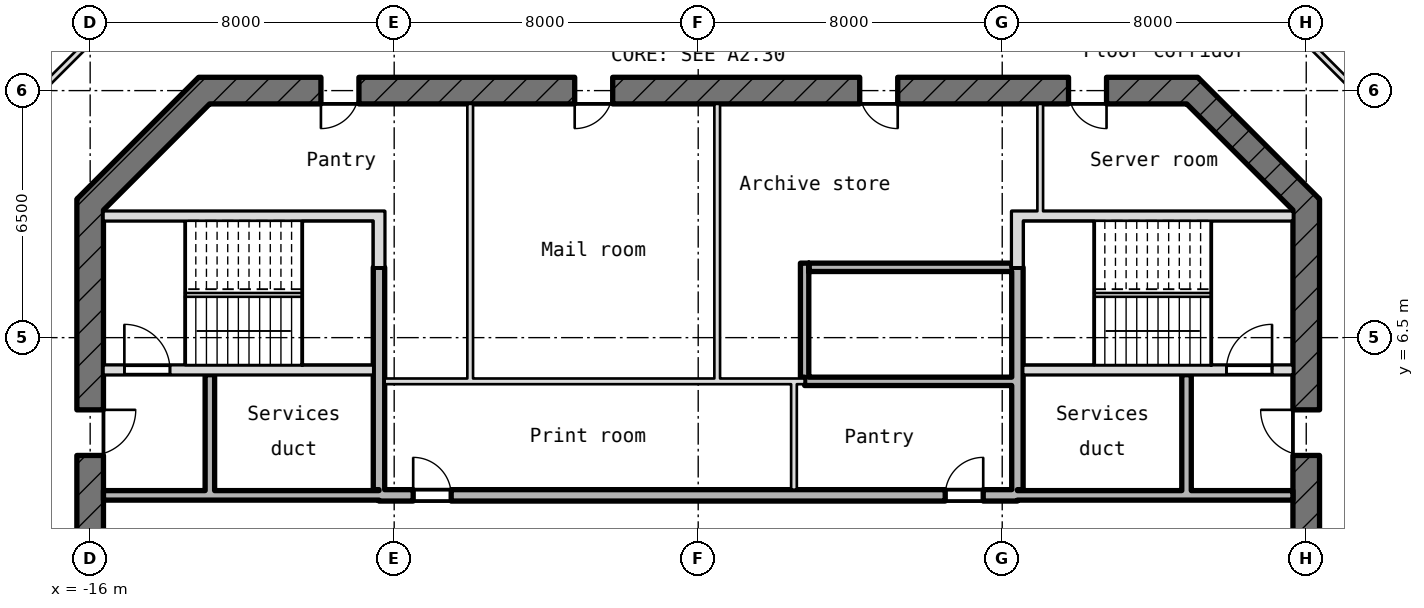
"""IFC4 building model, lengths in metres.
Left out: names, types, materials, properties, quantities, classifications, styles, units other than length and angle.
Written with IfcOpenShell. Run it as: python <this file> out.ifc"""

import sys

from ifc_helpers import new_model, si_unit, direction, frame, frame_2d, origin, place, context, subcontext, project, spatial, rectangle, extrude, element, fill, save


model = new_model("IFC4")
c1 = context("Model", 3, precision=1e-05, world=origin(), true_north=direction((0.0, 1.0)))
c2 = subcontext(c1, "Body", "Model", "MODEL_VIEW")
j1 = project(units=[si_unit("LENGTHUNIT", "METRE"), si_unit("PLANEANGLEUNIT", "RADIAN")], contexts=[c1])
p1 = place(None, origin())
s1 = spatial("IfcSite", under=j1, at=p1, CompositionType="ELEMENT")
p2 = place(p1, origin())
s2 = spatial("IfcBuilding", under=s1, at=p2, CompositionType="ELEMENT")
p3 = place(p2, frame((0.0, 0.0, 321.85)))
s3 = spatial("IfcBuildingStorey", under=s2, at=p3, CompositionType="ELEMENT", Elevation=321.85)
p4 = place(p3, frame((16.0, -10.145, -0.18), z_axis=(0.0, 0.0, 1.0), x_axis=(0.0, 1.0, 0.0)))
e1 = element("IfcWall", 1, at=p4, inside=s3, PredefinedType="SHEAR", context=c2, shape_type="SweptSolid", body=[
    extrude(rectangle(XDim=20.29, YDim=0.7, at=frame_2d((10.145, 0.0))), origin(), (0.0, 0.0, 1.0), 4.15),
])
p5 = place(p4, frame((8.945, 0.0, 0.18)))
e2 = element("IfcOpeningElement", 2, at=p5, cuts=e1, PredefinedType="OPENING", context=c2, shape_type="SweptSolid", body=[
    extrude(rectangle(XDim=2.4, YDim=2.1, at=frame_2d((1.2, 1.05))), frame((0.0, 0.36, 0.0), z_axis=(0.0, -1.0, 0.0), x_axis=(1.0, 0.0, 0.0)), (0.0, 0.0, 1.0), 0.72),
])
p6 = place(p4, frame((13.545, 0.0, 0.18)))
e3 = element("IfcOpeningElement", 3, at=p6, cuts=e1, PredefinedType="OPENING", context=c2, shape_type="SweptSolid", body=[
    extrude(rectangle(XDim=1.2, YDim=2.1, at=frame_2d((0.6, 1.05))), frame((0.0, 0.36, 0.0), z_axis=(0.0, -1.0, 0.0), x_axis=(1.0, 0.0, 0.0)), (0.0, 0.0, 1.0), 0.72),
])
p7 = place(p3, frame((16.103, 9.897, -0.18), z_axis=(0.0, 0.0, 1.0), x_axis=(-0.707106781187, 0.707106781187, 0.0)))
e4 = element("IfcWall", 4, at=p7, inside=s3, PredefinedType="SHEAR", context=c2, shape_type="SweptSolid", body=[
    extrude(rectangle(XDim=4.533, YDim=0.7, at=frame_2d((2.266, 0.0))), origin(), (0.0, 0.0, 1.0), 4.15),
])
p8 = place(p3, frame((13.145, 13.0, -0.18), z_axis=(0.0, 0.0, 1.0), x_axis=(-1.0, 0.0, 0.0)))
e5 = element("IfcWall", 5, at=p8, inside=s3, PredefinedType="SHEAR", context=c2, shape_type="SweptSolid", body=[
    extrude(rectangle(XDim=26.29, YDim=0.7, at=frame_2d((13.145, 0.0))), origin(), (0.0, 0.0, 1.0), 4.15),
])
p9 = place(p8, frame((22.073, 0.0, 0.18)))
e6 = element("IfcOpeningElement", 6, at=p9, cuts=e5, PredefinedType="OPENING", context=c2, shape_type="SweptSolid", body=[
    extrude(rectangle(XDim=1.0, YDim=2.1, at=frame_2d((0.5, 1.05))), frame((0.0, 0.36, 0.0), z_axis=(0.0, -1.0, 0.0), x_axis=(1.0, 0.0, 0.0)), (0.0, 0.0, 1.0), 0.72),
])
p10 = place(p8, frame((15.395, 0.0, 0.18)))
e7 = element("IfcOpeningElement", 7, at=p10, cuts=e5, PredefinedType="OPENING", context=c2, shape_type="SweptSolid", body=[
    extrude(rectangle(XDim=1.0, YDim=2.1, at=frame_2d((0.5, 1.05))), frame((0.0, 0.36, 0.0), z_axis=(0.0, -1.0, 0.0), x_axis=(1.0, 0.0, 0.0)), (0.0, 0.0, 1.0), 0.72),
])
p11 = place(p8, frame((7.895, 0.0, 0.18)))
e8 = element("IfcOpeningElement", 8, at=p11, cuts=e5, PredefinedType="OPENING", context=c2, shape_type="SweptSolid", body=[
    extrude(rectangle(XDim=1.0, YDim=2.1, at=frame_2d((0.5, 1.05))), frame((0.0, 0.36, 0.0), z_axis=(0.0, -1.0, 0.0), x_axis=(1.0, 0.0, 0.0)), (0.0, 0.0, 1.0), 0.72),
])
p12 = place(p8, frame((2.4, 0.0, 0.18)))
e9 = element("IfcOpeningElement", 9, at=p12, cuts=e5, PredefinedType="OPENING", context=c2, shape_type="SweptSolid", body=[
    extrude(rectangle(XDim=1.0, YDim=2.1, at=frame_2d((0.5, 1.05))), frame((0.0, 0.36, 0.0), z_axis=(0.0, -1.0, 0.0), x_axis=(1.0, 0.0, 0.0)), (0.0, 0.0, 1.0), 0.72),
])
p13 = place(p3, frame((-12.897, 13.103, -0.18), z_axis=(0.0, 0.0, 1.0), x_axis=(-0.707106781187, -0.707106781187, 0.0)))
e10 = element("IfcWall", 10, at=p13, inside=s3, PredefinedType="SHEAR", context=c2, shape_type="SweptSolid", body=[
    extrude(rectangle(XDim=4.533, YDim=0.7, at=frame_2d((2.266, 0.0))), origin(), (0.0, 0.0, 1.0), 4.15),
])
p14 = place(p3, frame((-16.0, 10.145, -0.18), z_axis=(0.0, 0.0, 1.0), x_axis=(0.0, -1.0, 0.0)))
e11 = element("IfcWall", 11, at=p14, inside=s3, PredefinedType="SHEAR", context=c2, shape_type="SweptSolid", body=[
    extrude(rectangle(XDim=20.29, YDim=0.7, at=frame_2d((10.145, 0.0))), origin(), (0.0, 0.0, 1.0), 4.15),
])
p15 = place(p14, frame((8.945, 0.0, 0.18)))
e12 = element("IfcOpeningElement", 12, at=p15, cuts=e11, PredefinedType="OPENING", context=c2, shape_type="SweptSolid", body=[
    extrude(rectangle(XDim=2.4, YDim=2.1, at=frame_2d((1.2, 1.05))), frame((0.0, 0.36, 0.0), z_axis=(0.0, -1.0, 0.0), x_axis=(1.0, 0.0, 0.0)), (0.0, 0.0, 1.0), 0.72),
])
p16 = place(p14, frame((5.545, 0.0, 0.18)))
e13 = element("IfcOpeningElement", 13, at=p16, cuts=e11, PredefinedType="OPENING", context=c2, shape_type="SweptSolid", body=[
    extrude(rectangle(XDim=1.2, YDim=2.1, at=frame_2d((0.6, 1.05))), frame((0.0, 0.36, 0.0), z_axis=(0.0, -1.0, 0.0), x_axis=(1.0, 0.0, 0.0)), (0.0, 0.0, 1.0), 0.72),
])
p17 = place(p3, frame((-15.65, 2.35, 0.0), z_axis=(0.0, 0.0, 1.0), x_axis=(1.0, 0.0, 0.0)))
e14 = element("IfcWall", 14, at=p17, inside=s3, PredefinedType="STANDARD", context=c2, shape_type="SweptSolid", body=[
    extrude(rectangle(XDim=7.25, YDim=0.25, at=frame_2d((3.625, 0.0))), origin(), (0.0, 0.0, 1.0), 3.97),
])
p18 = place(p3, frame((-8.4, 2.35, -0.18), z_axis=(0.0, 0.0, 1.0), x_axis=(1.0, 0.0, 0.0)))
e15 = element("IfcWall", 15, at=p18, inside=s3, PredefinedType="SHEAR", context=c2, shape_type="SweptSolid", body=[
    extrude(rectangle(XDim=16.8, YDim=0.3, at=frame_2d((8.4, 0.0))), origin(), (0.0, 0.0, 1.0), 4.15),
])
p19 = place(p18, frame((0.9, 0.0, 0.18)))
e16 = element("IfcOpeningElement", 16, at=p19, cuts=e15, PredefinedType="OPENING", context=c2, shape_type="SweptSolid", body=[
    extrude(rectangle(XDim=1.0, YDim=2.1, at=frame_2d((0.5, 1.05))), frame((0.0, 0.16, 0.0), z_axis=(0.0, -1.0, 0.0), x_axis=(1.0, 0.0, 0.0)), (0.0, 0.0, 1.0), 0.32),
])
p20 = place(p18, frame((14.9, 0.0, 0.18)))
e17 = element("IfcOpeningElement", 17, at=p20, cuts=e15, PredefinedType="OPENING", context=c2, shape_type="SweptSolid", body=[
    extrude(rectangle(XDim=1.0, YDim=2.1, at=frame_2d((0.5, 1.05))), frame((0.0, 0.16, 0.0), z_axis=(0.0, -1.0, 0.0), x_axis=(1.0, 0.0, 0.0)), (0.0, 0.0, 1.0), 0.32),
])
p21 = place(p3, frame((8.4, 2.35, 0.0), z_axis=(0.0, 0.0, 1.0), x_axis=(1.0, 0.0, 0.0)))
e18 = element("IfcWall", 18, at=p21, inside=s3, PredefinedType="STANDARD", context=c2, shape_type="SweptSolid", body=[
    extrude(rectangle(XDim=7.25, YDim=0.25, at=frame_2d((3.625, 0.0))), origin(), (0.0, 0.0, 1.0), 3.97),
])
p22 = place(p3, frame((-8.25, 5.35, 0.0), z_axis=(0.0, 0.0, 1.0), x_axis=(1.0, 0.0, 0.0)))
e19 = element("IfcWall", 19, at=p22, inside=s3, PredefinedType="PARTITIONING", context=c2, shape_type="SweptSolid", body=[
    extrude(rectangle(XDim=11.05, YDim=0.15, at=frame_2d((5.525, 0.0))), origin(), (0.0, 0.0, 1.0), 3.97),
])
p23 = place(p3, frame((2.8, 5.35, 0.0), z_axis=(0.0, 0.0, 1.0), x_axis=(1.0, 0.0, 0.0)))
e20 = element("IfcWall", 20, at=p23, inside=s3, PredefinedType="STANDARD", context=c2, shape_type="SweptSolid", body=[
    extrude(rectangle(XDim=5.45, YDim=0.22, at=frame_2d((2.725, 0.0))), origin(), (0.0, 0.0, 1.0), 3.97),
])
p24 = place(p3, frame((-15.65, 5.65, -0.18), z_axis=(0.0, 0.0, 1.0), x_axis=(1.0, 0.0, 0.0)))
e21 = element("IfcWall", 21, at=p24, inside=s3, PredefinedType="SHEAR", context=c2, shape_type="SweptSolid", body=[
    extrude(rectangle(XDim=7.1, YDim=0.25, at=frame_2d((3.55, 0.0))), origin(), (0.0, 0.0, 1.0), 4.15),
])
p25 = place(p24, frame((0.55, 0.0, 0.18)))
e22 = element("IfcOpeningElement", 22, at=p25, cuts=e21, PredefinedType="OPENING", context=c2, shape_type="SweptSolid", body=[
    extrude(rectangle(XDim=1.2, YDim=2.1, at=frame_2d((0.6, 1.05))), frame((0.0, 0.135, 0.0), z_axis=(0.0, -1.0, 0.0), x_axis=(1.0, 0.0, 0.0)), (0.0, 0.0, 1.0), 0.27),
])
p26 = place(p3, frame((8.55, 5.65, -0.18), z_axis=(0.0, 0.0, 1.0), x_axis=(1.0, 0.0, 0.0)))
e23 = element("IfcWall", 23, at=p26, inside=s3, PredefinedType="SHEAR", context=c2, shape_type="SweptSolid", body=[
    extrude(rectangle(XDim=7.1, YDim=0.25, at=frame_2d((3.55, 0.0))), origin(), (0.0, 0.0, 1.0), 4.15),
])
p27 = place(p26, frame((5.35, 0.0, 0.18)))
e24 = element("IfcOpeningElement", 24, at=p27, cuts=e23, PredefinedType="OPENING", context=c2, shape_type="SweptSolid", body=[
    extrude(rectangle(XDim=1.2, YDim=2.1, at=frame_2d((0.6, 1.05))), frame((0.0, 0.135, 0.0), z_axis=(0.0, -1.0, 0.0), x_axis=(1.0, 0.0, 0.0)), (0.0, 0.0, 1.0), 0.27),
])
p28 = place(p3, frame((2.91, 8.35, 0.0), z_axis=(0.0, 0.0, 1.0), x_axis=(1.0, 0.0, 0.0)))
e25 = element("IfcWall", 25, at=p28, inside=s3, PredefinedType="STANDARD", context=c2, shape_type="SweptSolid", body=[
    extrude(rectangle(XDim=5.34, YDim=0.22, at=frame_2d((2.67, 0.0))), origin(), (0.0, 0.0, 1.0), 3.97),
])
for number, where, z_axis, x_axis in (
    (26, (-15.65, 9.7, -0.18), (0.0, 0.0, 1.0), (1.0, 0.0, 0.0)),
    (27, (8.55, 9.7, -0.18), (0.0, 0.0, 1.0), (1.0, 0.0, 0.0)),
):
    element("IfcWall", number, at=place(p3, frame(where, z_axis=z_axis, x_axis=x_axis)), inside=s3, PredefinedType="SHEAR", context=c2, shape_type="SweptSolid", body=[
        extrude(rectangle(XDim=7.1, YDim=0.25, at=frame_2d((3.55, 0.0))), origin(), (0.0, 0.0, 1.0), 4.15),
    ])
p29 = place(p3, frame((-12.85, 2.475, 0.0), z_axis=(0.0, 0.0, 1.0), x_axis=(0.0, 1.0, 0.0)))
e28 = element("IfcWall", 28, at=p29, inside=s3, PredefinedType="STANDARD", context=c2, shape_type="SweptSolid", body=[
    extrude(rectangle(XDim=3.05, YDim=0.25, at=frame_2d((1.525, 0.0))), origin(), (0.0, 0.0, 1.0), 3.97),
])
p30 = place(p3, frame((-8.4, 2.5, -0.18), z_axis=(0.0, 0.0, 1.0), x_axis=(0.0, 1.0, 0.0)))
e29 = element("IfcWall", 29, at=p30, inside=s3, PredefinedType="SHEAR", context=c2, shape_type="SweptSolid", body=[
    extrude(rectangle(XDim=5.85, YDim=0.3, at=frame_2d((2.925, 0.0))), origin(), (0.0, 0.0, 1.0), 4.15),
])
p31 = place(p3, frame((-8.4, 8.35, -0.18), z_axis=(0.0, 0.0, 1.0), x_axis=(0.0, 1.0, 0.0)))
e30 = element("IfcWall", 30, at=p31, inside=s3, PredefinedType="SHEAR", context=c2, shape_type="SweptSolid", body=[
    extrude(rectangle(XDim=1.475, YDim=0.3, at=frame_2d((0.737, 0.0))), origin(), (0.0, 0.0, 1.0), 4.15),
])
for number, where, z_axis, x_axis in (
    (31, (-6.0, 5.425, 0.0), (0.0, 0.0, 1.0), (0.0, 1.0, 0.0)),
    (32, (0.5, 5.425, 0.0), (0.0, 0.0, 1.0), (0.0, 1.0, 0.0)),
):
    element("IfcWall", number, at=place(p3, frame(where, z_axis=z_axis, x_axis=x_axis)), inside=s3, PredefinedType="PARTITIONING", context=c2, shape_type="SweptSolid", body=[
        extrude(rectangle(XDim=7.225, YDim=0.15, at=frame_2d((3.612, 0.0))), origin(), (0.0, 0.0, 1.0), 3.97),
    ])
p32 = place(p3, frame((2.52, 2.5, 0.0), z_axis=(0.0, 0.0, 1.0), x_axis=(0.0, 1.0, 0.0)))
e33 = element("IfcWall", 33, at=p32, inside=s3, PredefinedType="PARTITIONING", context=c2, shape_type="SweptSolid", body=[
    extrude(rectangle(XDim=2.775, YDim=0.15, at=frame_2d((1.387, 0.0))), origin(), (0.0, 0.0, 1.0), 3.97),
])
p33 = place(p3, frame((2.8, 5.46, 0.0), z_axis=(0.0, 0.0, 1.0), x_axis=(0.0, 1.0, 0.0)))
e34 = element("IfcWall", 34, at=p33, inside=s3, PredefinedType="STANDARD", context=c2, shape_type="SweptSolid", body=[
    extrude(rectangle(XDim=3.0, YDim=0.22, at=frame_2d((1.5, 0.0))), origin(), (0.0, 0.0, 1.0), 3.97),
])
p34 = place(p3, frame((8.4, 2.5, -0.18), z_axis=(0.0, 0.0, 1.0), x_axis=(0.0, 1.0, 0.0)))
e35 = element("IfcWall", 35, at=p34, inside=s3, PredefinedType="SHEAR", context=c2, shape_type="SweptSolid", body=[
    extrude(rectangle(XDim=5.85, YDim=0.3, at=frame_2d((2.925, 0.0))), origin(), (0.0, 0.0, 1.0), 4.15),
])
p35 = place(p3, frame((8.4, 8.35, -0.18), z_axis=(0.0, 0.0, 1.0), x_axis=(0.0, 1.0, 0.0)))
e36 = element("IfcWall", 36, at=p35, inside=s3, PredefinedType="SHEAR", context=c2, shape_type="SweptSolid", body=[
    extrude(rectangle(XDim=1.475, YDim=0.3, at=frame_2d((0.737, 0.0))), origin(), (0.0, 0.0, 1.0), 4.15),
])
p36 = place(p3, frame((9.0, 9.825, 0.0), z_axis=(0.0, 0.0, 1.0), x_axis=(0.0, 1.0, 0.0)))
e37 = element("IfcWall", 37, at=p36, inside=s3, PredefinedType="PARTITIONING", context=c2, shape_type="SweptSolid", body=[
    extrude(rectangle(XDim=2.825, YDim=0.15, at=frame_2d((1.413, 0.0))), origin(), (0.0, 0.0, 1.0), 3.97),
])
p37 = place(p3, frame((12.85, 2.475, 0.0), z_axis=(0.0, 0.0, 1.0), x_axis=(0.0, 1.0, 0.0)))
e38 = element("IfcWall", 38, at=p37, inside=s3, PredefinedType="STANDARD", context=c2, shape_type="SweptSolid", body=[
    extrude(rectangle(XDim=3.05, YDim=0.25, at=frame_2d((1.525, 0.0))), origin(), (0.0, 0.0, 1.0), 3.97),
])
for number, where, z_axis, x_axis in (
    (39, (-19.05, 11.263, 0.0), (0.0, 0.0, 1.0), (0.707, 0.707, 0.0)),
    (40, (14.263, 16.05, 0.0), (0.0, 0.0, 1.0), (0.707, -0.707, 0.0)),
):
    element("IfcWall", number, at=place(p3, frame(where, z_axis=z_axis, x_axis=x_axis)), inside=s3, PredefinedType="PARTITIONING", context=c2, shape_type="SweptSolid", body=[
        extrude(rectangle(XDim=6.769, YDim=0.15, at=frame_2d((3.385, 0.0))), origin(), (0.0, 0.0, 1.0), 3.97),
    ])
p38 = place(p25, origin())
e41 = element("IfcDoor", 41, at=p38, inside=s3, OperationType="SINGLE_SWING_RIGHT", PredefinedType="DOOR", context=c2, shape_type="SweptSolid", body=[
    extrude(rectangle(XDim=1.2, YDim=2.1, at=frame_2d((0.6, 1.05))), frame((0.0, 0.025, 0.0), z_axis=(0.0, -1.0, 0.0), x_axis=(1.0, 0.0, 0.0)), (0.0, 0.0, 1.0), 0.05),
])
fill(e22, e41)
p39 = place(p27, origin())
e42 = element("IfcDoor", 42, at=p39, inside=s3, OperationType="SINGLE_SWING_RIGHT", PredefinedType="DOOR", context=c2, shape_type="SweptSolid", body=[
    extrude(rectangle(XDim=1.2, YDim=2.1, at=frame_2d((0.6, 1.05))), frame((0.0, 0.025, 0.0), z_axis=(0.0, -1.0, 0.0), x_axis=(1.0, 0.0, 0.0)), (0.0, 0.0, 1.0), 0.05),
])
fill(e24, e42)
p40 = place(p16, origin())
e43 = element("IfcDoor", 43, at=p40, inside=s3, OperationType="SINGLE_SWING_RIGHT", PredefinedType="DOOR", context=c2, shape_type="SweptSolid", body=[
    extrude(rectangle(XDim=1.2, YDim=2.1, at=frame_2d((0.6, 1.05))), frame((0.0, 0.025, 0.0), z_axis=(0.0, -1.0, 0.0), x_axis=(1.0, 0.0, 0.0)), (0.0, 0.0, 1.0), 0.05),
])
fill(e13, e43)
p41 = place(p6, origin())
e44 = element("IfcDoor", 44, at=p41, inside=s3, OperationType="SINGLE_SWING_RIGHT", PredefinedType="DOOR", context=c2, shape_type="SweptSolid", body=[
    extrude(rectangle(XDim=1.2, YDim=2.1, at=frame_2d((0.6, 1.05))), frame((0.0, 0.025, 0.0), z_axis=(0.0, -1.0, 0.0), x_axis=(1.0, 0.0, 0.0)), (0.0, 0.0, 1.0), 0.05),
])
fill(e3, e44)
p42 = place(p19, origin())
e45 = element("IfcDoor", 45, at=p42, inside=s3, OperationType="SINGLE_SWING_RIGHT", PredefinedType="DOOR", context=c2, shape_type="SweptSolid", body=[
    extrude(rectangle(XDim=1.0, YDim=2.1, at=frame_2d((0.5, 1.05))), frame((0.0, 0.025, 0.0), z_axis=(0.0, -1.0, 0.0), x_axis=(1.0, 0.0, 0.0)), (0.0, 0.0, 1.0), 0.05),
])
fill(e16, e45)
p43 = place(p20, origin())
e46 = element("IfcDoor", 46, at=p43, inside=s3, OperationType="SINGLE_SWING_RIGHT", PredefinedType="DOOR", context=c2, shape_type="SweptSolid", body=[
    extrude(rectangle(XDim=1.0, YDim=2.1, at=frame_2d((0.5, 1.05))), frame((0.0, 0.025, 0.0), z_axis=(0.0, -1.0, 0.0), x_axis=(1.0, 0.0, 0.0)), (0.0, 0.0, 1.0), 0.05),
])
fill(e17, e46)
p44 = place(p9, origin())
e47 = element("IfcDoor", 47, at=p44, inside=s3, OperationType="SINGLE_SWING_RIGHT", PredefinedType="DOOR", context=c2, shape_type="SweptSolid", body=[
    extrude(rectangle(XDim=1.0, YDim=2.1, at=frame_2d((0.5, 1.05))), frame((0.0, 0.025, 0.0), z_axis=(0.0, -1.0, 0.0), x_axis=(1.0, 0.0, 0.0)), (0.0, 0.0, 1.0), 0.05),
])
fill(e6, e47)
p45 = place(p10, origin())
e48 = element("IfcDoor", 48, at=p45, inside=s3, OperationType="SINGLE_SWING_RIGHT", PredefinedType="DOOR", context=c2, shape_type="SweptSolid", body=[
    extrude(rectangle(XDim=1.0, YDim=2.1, at=frame_2d((0.5, 1.05))), frame((0.0, 0.025, 0.0), z_axis=(0.0, -1.0, 0.0), x_axis=(1.0, 0.0, 0.0)), (0.0, 0.0, 1.0), 0.05),
])
fill(e7, e48)
p46 = place(p11, origin())
e49 = element("IfcDoor", 49, at=p46, inside=s3, OperationType="SINGLE_SWING_RIGHT", PredefinedType="DOOR", context=c2, shape_type="SweptSolid", body=[
    extrude(rectangle(XDim=1.0, YDim=2.1, at=frame_2d((0.5, 1.05))), frame((0.0, 0.025, 0.0), z_axis=(0.0, -1.0, 0.0), x_axis=(1.0, 0.0, 0.0)), (0.0, 0.0, 1.0), 0.05),
])
fill(e8, e49)
p47 = place(p12, origin())
e50 = element("IfcDoor", 50, at=p47, inside=s3, OperationType="SINGLE_SWING_RIGHT", PredefinedType="DOOR", context=c2, shape_type="SweptSolid", body=[
    extrude(rectangle(XDim=1.0, YDim=2.1, at=frame_2d((0.5, 1.05))), frame((0.0, 0.025, 0.0), z_axis=(0.0, -1.0, 0.0), x_axis=(1.0, 0.0, 0.0)), (0.0, 0.0, 1.0), 0.05),
])
fill(e9, e50)
save(model, sys.argv[1])
